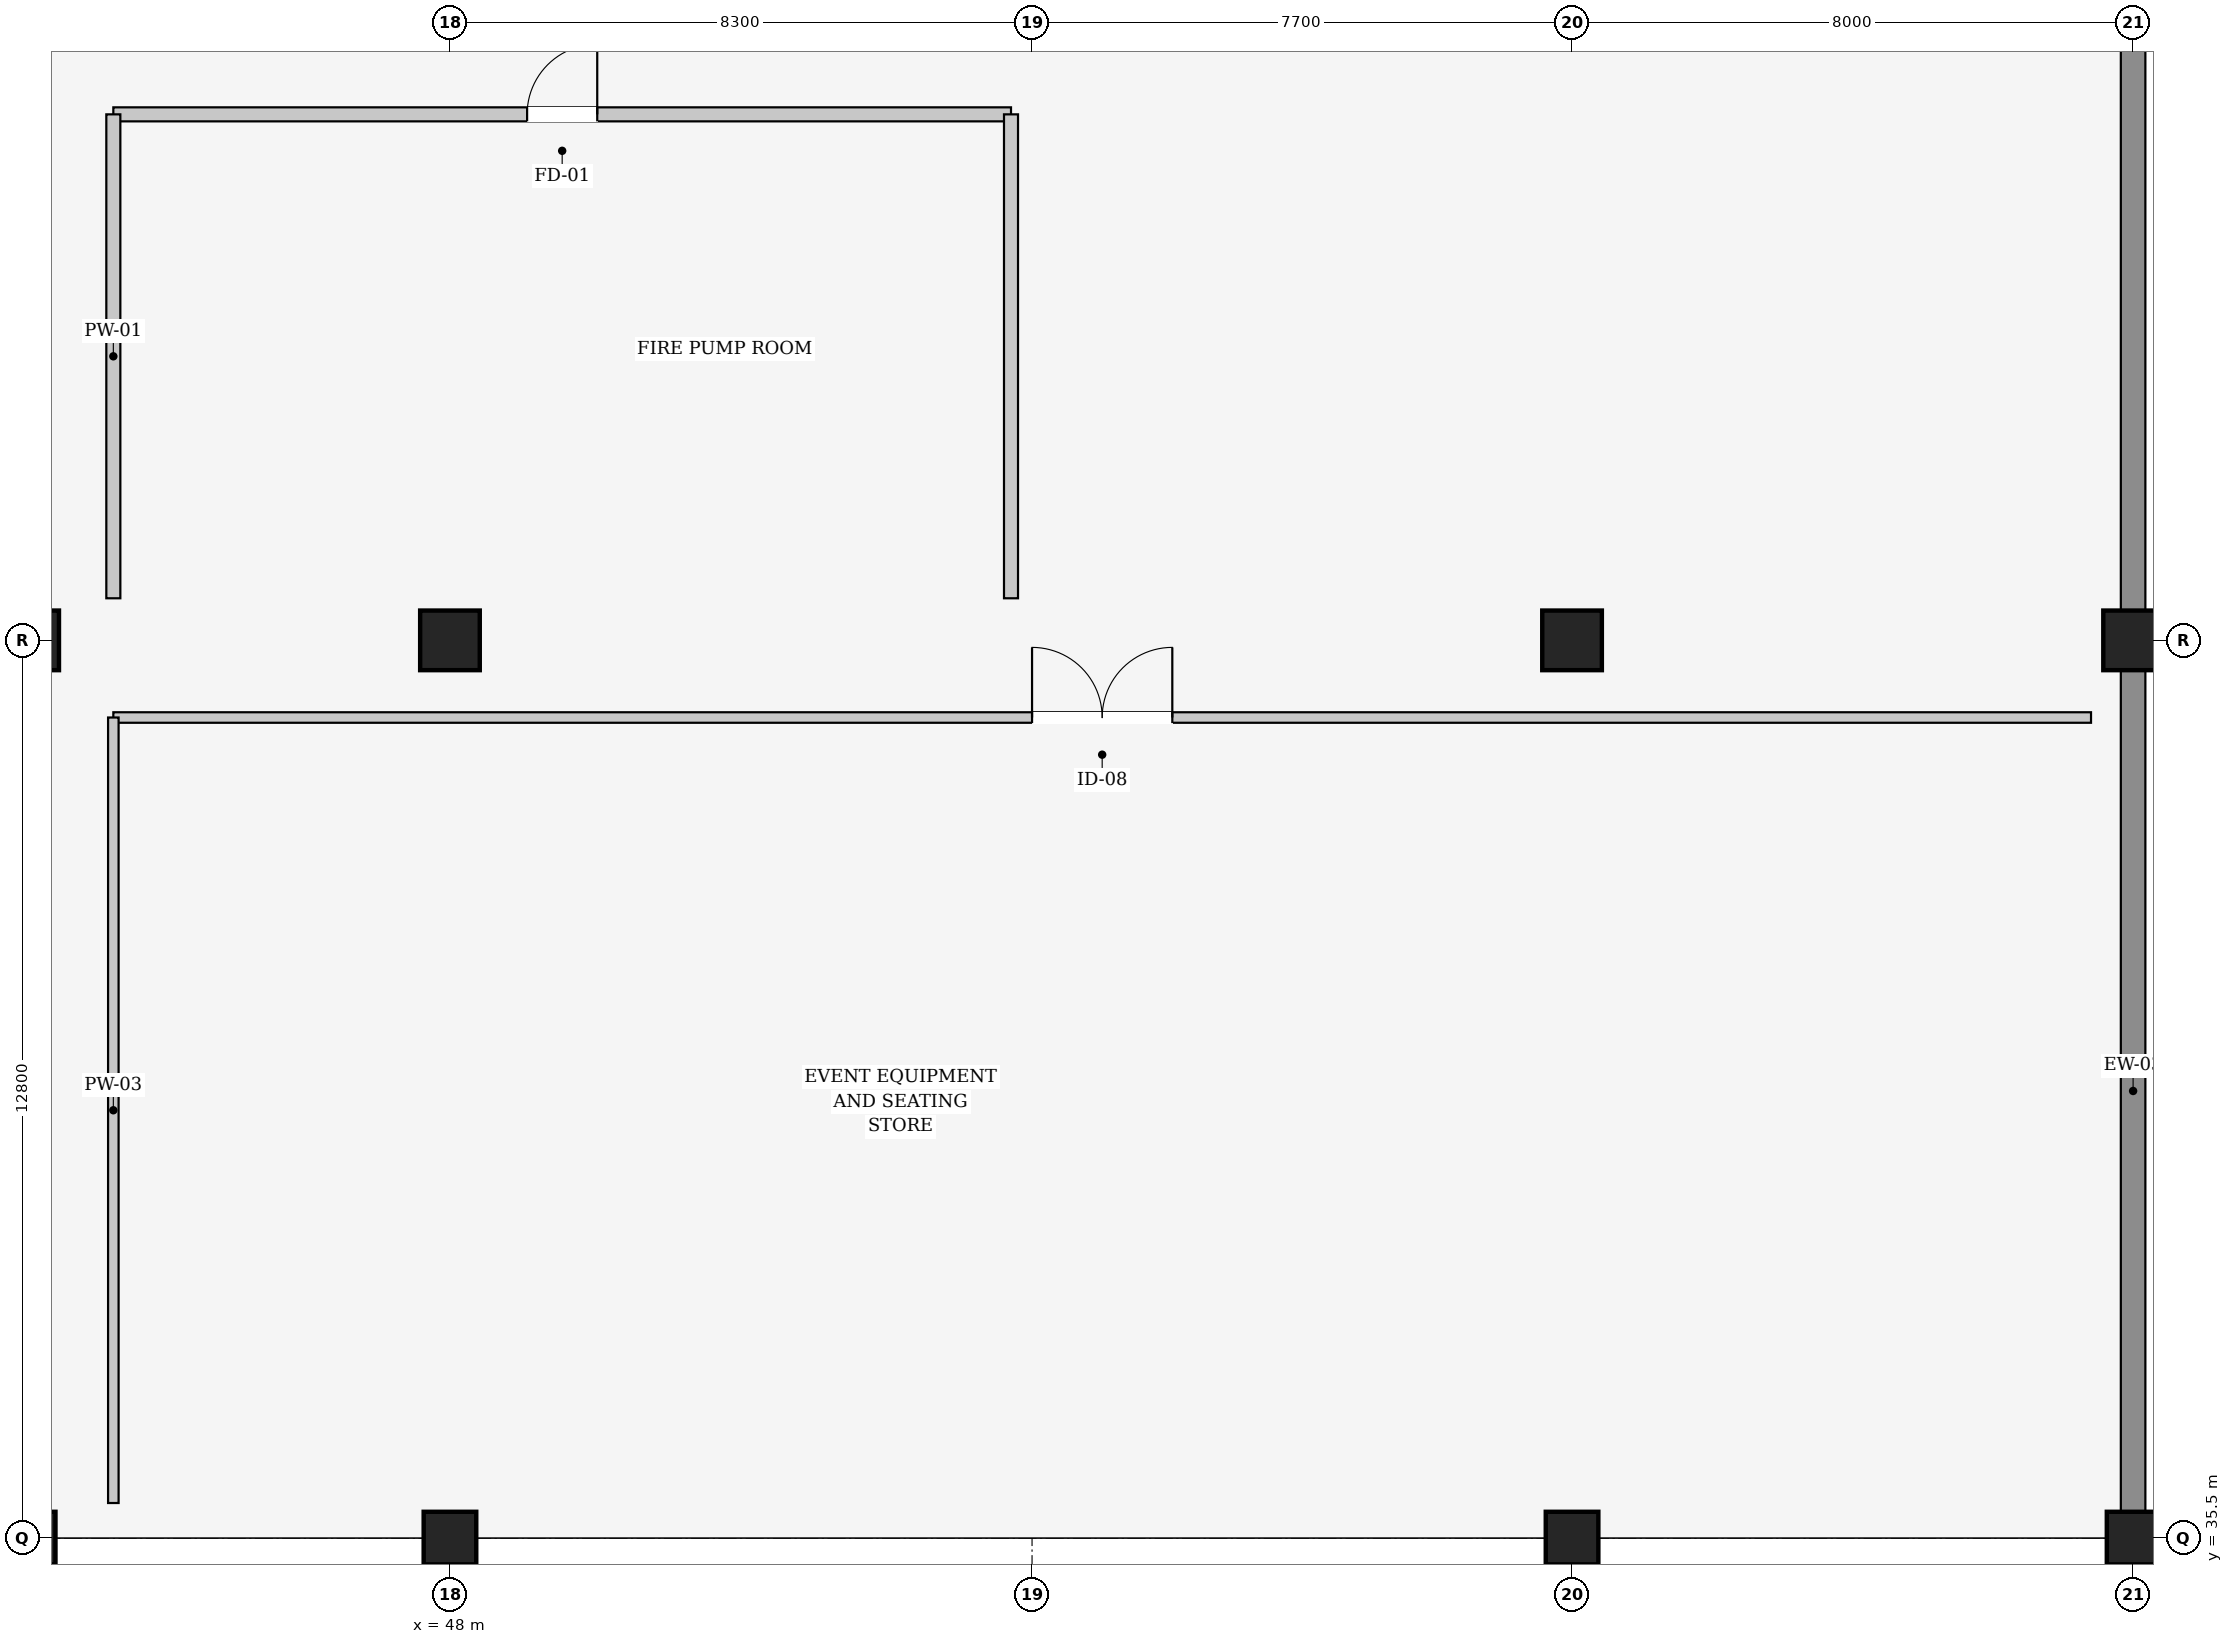
"""IFC4 building model, lengths in metres.
Left out: names, types, materials, properties, quantities, classifications, styles, units other than length and angle.
Written with IfcOpenShell. Run it as: python <this file> out.ifc"""

import sys

from ifc_helpers import new_model, si_unit, direction, frame, frame_2d, origin, origin_2d, place, context, subcontext, project, spatial, rectangle, extrude, element, fill, save


model = new_model("IFC4")
c1 = context("Model", 3, precision=1e-05, world=origin(), true_north=direction((0.0, 1.0)))
c2 = subcontext(c1, "Body", "Model", "MODEL_VIEW")
j1 = project(units=[si_unit("LENGTHUNIT", "METRE"), si_unit("PLANEANGLEUNIT", "RADIAN")], contexts=[c1])
p1 = place(None, origin())
s1 = spatial("IfcSite", under=j1, at=p1, CompositionType="ELEMENT")
p2 = place(p1, origin())
s2 = spatial("IfcBuilding", under=s1, at=p2, CompositionType="ELEMENT")
p3 = place(p2, origin())
s3 = spatial("IfcBuildingStorey", under=s2, at=p3, CompositionType="ELEMENT", Elevation=0.0)
p4 = place(p3, frame((42.0, 35.5, 0.0), z_axis=(0.0, 0.0, 1.0), x_axis=(1.0, 0.0, 0.0)))
e1 = element("IfcColumn", 1, at=p4, inside=s3, PredefinedType="COLUMN", context=c2, shape_type="SweptSolid", body=[
    extrude(rectangle(XDim=0.75, YDim=0.75, at=origin_2d()), origin(), (0.0, 0.0, 1.0), 6.0),
])
p5 = place(p3, frame((42.0, 48.3, 0.0), z_axis=(0.0, 0.0, 1.0), x_axis=(1.0, 0.0, 0.0)))
e2 = element("IfcColumn", 2, at=p5, inside=s3, PredefinedType="COLUMN", context=c2, shape_type="SweptSolid", body=[
    extrude(rectangle(XDim=0.85, YDim=0.85, at=origin_2d()), origin(), (0.0, 0.0, 1.0), 6.0),
])
p6 = place(p3, frame((48.0, 35.5, 0.0), z_axis=(0.0, 0.0, 1.0), x_axis=(1.0, 0.0, 0.0)))
e3 = element("IfcColumn", 3, at=p6, inside=s3, PredefinedType="COLUMN", context=c2, shape_type="SweptSolid", body=[
    extrude(rectangle(XDim=0.75, YDim=0.75, at=origin_2d()), origin(), (0.0, 0.0, 1.0), 6.0),
])
p7 = place(p3, frame((48.0, 48.3, 0.0), z_axis=(0.0, 0.0, 1.0), x_axis=(1.0, 0.0, 0.0)))
e4 = element("IfcColumn", 4, at=p7, inside=s3, PredefinedType="COLUMN", context=c2, shape_type="SweptSolid", body=[
    extrude(rectangle(XDim=0.85, YDim=0.85, at=origin_2d()), origin(), (0.0, 0.0, 1.0), 6.0),
])
p8 = place(p3, frame((64.0, 35.5, 0.0), z_axis=(0.0, 0.0, 1.0), x_axis=(1.0, 0.0, 0.0)))
e5 = element("IfcColumn", 5, at=p8, inside=s3, PredefinedType="COLUMN", context=c2, shape_type="SweptSolid", body=[
    extrude(rectangle(XDim=0.75, YDim=0.75, at=origin_2d()), origin(), (0.0, 0.0, 1.0), 6.0),
])
p9 = place(p3, frame((64.0, 48.3, 0.0), z_axis=(0.0, 0.0, 1.0), x_axis=(1.0, 0.0, 0.0)))
e6 = element("IfcColumn", 6, at=p9, inside=s3, PredefinedType="COLUMN", context=c2, shape_type="SweptSolid", body=[
    extrude(rectangle(XDim=0.85, YDim=0.85, at=origin_2d()), origin(), (0.0, 0.0, 1.0), 6.0),
])
p10 = place(p3, frame((72.0, 35.5, 0.0), z_axis=(0.0, 0.0, 1.0), x_axis=(1.0, 0.0, 0.0)))
e7 = element("IfcColumn", 7, at=p10, inside=s3, PredefinedType="COLUMN", context=c2, shape_type="SweptSolid", body=[
    extrude(rectangle(XDim=0.75, YDim=0.75, at=origin_2d()), origin(), (0.0, 0.0, 1.0), 6.0),
])
p11 = place(p3, frame((72.0, 48.3, 0.0), z_axis=(0.0, 0.0, 1.0), x_axis=(1.0, 0.0, 0.0)))
e8 = element("IfcColumn", 8, at=p11, inside=s3, PredefinedType="COLUMN", context=c2, shape_type="SweptSolid", body=[
    extrude(rectangle(XDim=0.85, YDim=0.85, at=origin_2d()), origin(), (0.0, 0.0, 1.0), 6.0),
])
p12 = place(p3, frame((72.0, 47.893, 0.0), z_axis=(0.0, 0.0, 1.0), x_axis=(0.0, -1.0, 0.0)))
e9 = element("IfcWall", 9, at=p12, inside=s3, PredefinedType="SOLIDWALL", context=c2, shape_type="SweptSolid", body=[
    extrude(rectangle(XDim=12.036, YDim=0.35, at=frame_2d((6.018, 0.0))), origin(), (0.0, 0.0, 1.0), 4.94),
])
p13 = place(p3, frame((72.0, 61.093, 0.0), z_axis=(0.0, 0.0, 1.0), x_axis=(0.0, -1.0, 0.0)))
e10 = element("IfcWall", 10, at=p13, inside=s3, PredefinedType="SOLIDWALL", context=c2, shape_type="SweptSolid", body=[
    extrude(rectangle(XDim=12.386, YDim=0.35, at=frame_2d((6.193, 0.0))), origin(), (0.0, 0.0, 1.0), 4.94),
])
p14 = place(p3, frame((43.2, 55.8, 0.0), z_axis=(0.0, 0.0, 1.0), x_axis=(1.0, 0.0, 0.0)))
e11 = element("IfcWall", 11, at=p14, inside=s3, PredefinedType="PARTITIONING", context=c2, shape_type="SweptSolid", body=[
    extrude(rectangle(XDim=12.8, YDim=0.2, at=frame_2d((6.4, 0.0))), origin(), (0.0, 0.0, 1.0), 5.142),
])
p15 = place(p14, frame((5.9, 0.0, 0.0)))
e12 = element("IfcOpeningElement", 12, at=p15, cuts=e11, PredefinedType="OPENING", context=c2, shape_type="SweptSolid", body=[
    extrude(rectangle(XDim=1.0, YDim=2.15, at=frame_2d((0.5, 1.075))), frame((0.0, 0.11, 0.0), z_axis=(0.0, -1.0, 0.0), x_axis=(1.0, 0.0, 0.0)), (0.0, 0.0, 1.0), 0.22),
])
for number, where, z_axis, x_axis in (
    (13, (43.2, 48.9, 0.0), (0.0, 0.0, 1.0), (0.0, 1.0, 0.0)),
    (14, (56.0, 55.8, 0.0), (0.0, 0.0, 1.0), (0.0, -1.0, 0.0)),
):
    element("IfcWall", number, at=place(p3, frame(where, z_axis=z_axis, x_axis=x_axis)), inside=s3, PredefinedType="PARTITIONING", context=c2, shape_type="SweptSolid", body=[
        extrude(rectangle(XDim=6.9, YDim=0.2, at=frame_2d((3.45, 0.0))), origin(), (0.0, 0.0, 1.0), 5.32),
    ])
p16 = place(p3, frame((43.2, 47.2, 0.0), z_axis=(0.0, 0.0, 1.0), x_axis=(1.0, 0.0, 0.0)))
e15 = element("IfcWall", 15, at=p16, inside=s3, PredefinedType="PARTITIONING", context=c2, shape_type="SweptSolid", body=[
    extrude(rectangle(XDim=28.2, YDim=0.15, at=frame_2d((14.1, 0.0))), origin(), (0.0, 0.0, 1.0), 5.142),
])
p17 = place(p16, frame((13.1, 0.0, 0.0)))
e16 = element("IfcOpeningElement", 16, at=p17, cuts=e15, PredefinedType="OPENING", context=c2, shape_type="SweptSolid", body=[
    extrude(rectangle(XDim=2.0, YDim=2.4, at=frame_2d((1.0, 1.2))), frame((0.0, 0.085, 0.0), z_axis=(0.0, -1.0, 0.0), x_axis=(1.0, 0.0, 0.0)), (0.0, 0.0, 1.0), 0.17),
])
p18 = place(p3, frame((43.2, 36.0, 0.0), z_axis=(0.0, 0.0, 1.0), x_axis=(0.0, 1.0, 0.0)))
e17 = element("IfcWall", 17, at=p18, inside=s3, PredefinedType="PARTITIONING", context=c2, shape_type="SweptSolid", body=[
    extrude(rectangle(XDim=11.2, YDim=0.15, at=frame_2d((5.6, 0.0))), origin(), (0.0, 0.0, 1.0), 5.32),
])
p19 = place(p15, origin())
e18 = element("IfcDoor", 18, at=p19, inside=s3, OperationType="SINGLE_SWING_RIGHT", PredefinedType="DOOR", context=c2, shape_type="SweptSolid", body=[
    extrude(rectangle(XDim=1.0, YDim=2.15, at=frame_2d((0.5, 1.075))), frame((0.0, 0.025, 0.0), z_axis=(0.0, -1.0, 0.0), x_axis=(1.0, 0.0, 0.0)), (0.0, 0.0, 1.0), 0.05),
])
fill(e12, e18)
p20 = place(p17, origin())
e19 = element("IfcDoor", 19, at=p20, inside=s3, OperationType="DOUBLE_DOOR_SINGLE_SWING", PredefinedType="DOOR", context=c2, shape_type="SweptSolid", body=[
    extrude(rectangle(XDim=2.0, YDim=2.4, at=frame_2d((1.0, 1.2))), frame((0.0, 0.025, 0.0), z_axis=(0.0, -1.0, 0.0), x_axis=(1.0, 0.0, 0.0)), (0.0, 0.0, 1.0), 0.05),
])
fill(e16, e19)
save(model, sys.argv[1])
